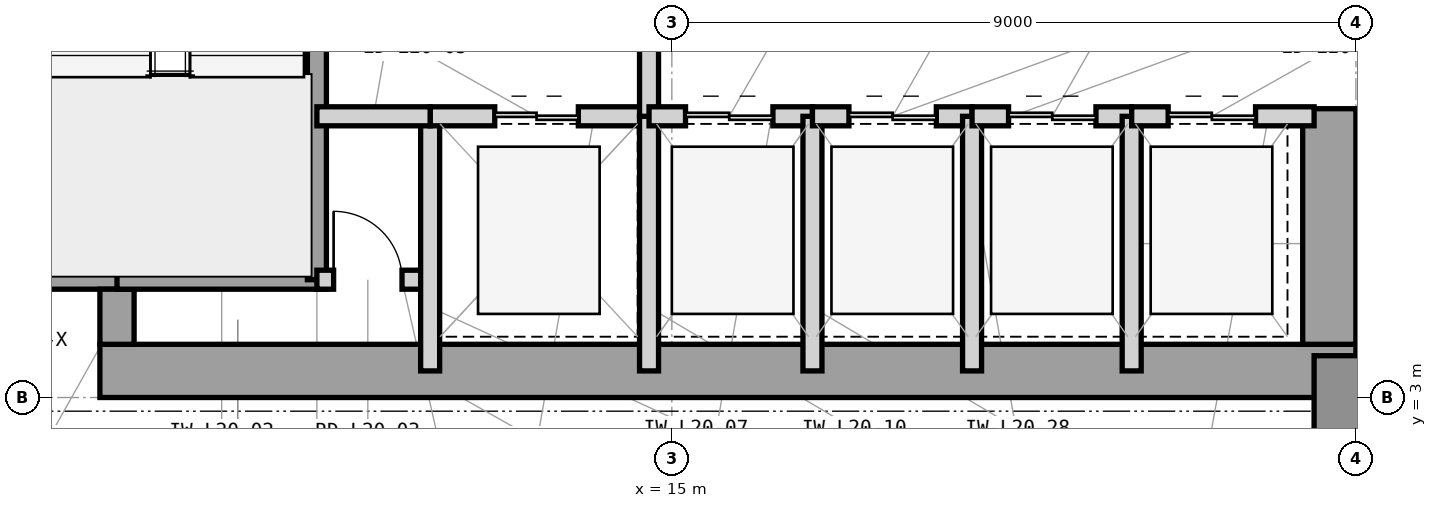
"""IFC4 building model, lengths in metres.
Left out: names, types, materials, properties, quantities, classifications, styles, units other than length and angle.
Written with IfcOpenShell. Run it as: python <this file> out.ifc"""

import sys

from ifc_helpers import new_model, si_unit, direction, frame, frame_2d, origin, origin_2d, place, context, subcontext, project, spatial, rectangle, extrude, element, fill, save


model = new_model("IFC4")
c1 = context("Model", 3, precision=1e-05, world=origin(), true_north=direction((0.0, 1.0)))
c2 = subcontext(c1, "Body", "Model", "MODEL_VIEW")
j1 = project(units=[si_unit("LENGTHUNIT", "METRE"), si_unit("PLANEANGLEUNIT", "RADIAN")], contexts=[c1])
p1 = place(None, origin())
s1 = spatial("IfcSite", under=j1, at=p1, CompositionType="ELEMENT")
p2 = place(p1, origin())
s2 = spatial("IfcBuilding", under=s1, at=p2, CompositionType="ELEMENT")
p3 = place(p2, frame((0.0, 0.0, 89.1)))
s3 = spatial("IfcBuildingStorey", under=s2, at=p3, CompositionType="ELEMENT", Elevation=89.1)
p4 = place(p3, frame((7.475, 3.35, 0.0), z_axis=(0.0, 0.0, 1.0), x_axis=(1.0, 0.0, 0.0)))
e1 = element("IfcWall", 1, at=p4, inside=s3, PredefinedType="SHEAR", context=c2, shape_type="SweptSolid", body=[
    extrude(rectangle(XDim=16.525, YDim=0.7, at=frame_2d((8.262, 0.0))), origin(), (0.0, 0.0, 1.0), 4.2),
])
p5 = place(p3, frame((23.65, 3.7, 0.0), z_axis=(0.0, 0.0, 1.0), x_axis=(0.0, 1.0, 0.0)))
e2 = element("IfcWall", 2, at=p5, inside=s3, PredefinedType="SHEAR", context=c2, shape_type="SweptSolid", body=[
    extrude(rectangle(XDim=3.1, YDim=0.7, at=frame_2d((1.55, 0.0))), origin(), (0.0, 0.0, 1.0), 4.2),
])
p6 = place(p3, frame((6.7, 4.65, 0.0), z_axis=(0.0, 0.0, 1.0), x_axis=(1.0, 0.0, 0.0)))
e3 = element("IfcWall", 3, at=p6, inside=s3, PredefinedType="SHEAR", context=c2, shape_type="SweptSolid", body=[
    extrude(rectangle(XDim=1.225, YDim=0.45, at=frame_2d((0.613, 0.0))), origin(), (0.0, 0.0, 1.0), 4.2),
])
p7 = place(p3, frame((7.7, 3.7, 0.0), z_axis=(0.0, 0.0, 1.0), x_axis=(0.0, 1.0, 0.0)))
e4 = element("IfcWall", 4, at=p7, inside=s3, PredefinedType="SHEAR", context=c2, shape_type="SweptSolid", body=[
    extrude(rectangle(XDim=0.725, YDim=0.45, at=frame_2d((0.363, 0.0))), origin(), (0.0, 0.0, 1.0), 4.2),
])
p8 = place(p3, frame((24.0, 3.0, 0.0), z_axis=(0.0, 0.0, 1.0), x_axis=(1.0, 0.0, 0.0)))
e5 = element("IfcColumn", 5, at=p8, inside=s3, PredefinedType="COLUMN", context=c2, shape_type="SweptSolid", body=[
    extrude(rectangle(XDim=1.1, YDim=1.1, at=origin_2d()), origin(), (0.0, 0.0, 1.0), 4.2),
])
p9 = place(p3, frame((23.9, 3.19, 0.0), z_axis=(0.0, 0.0, 1.0), x_axis=(1.0, 0.0, 0.0)))
e6 = element("IfcWall", 6, at=p9, inside=s3, PredefinedType="STANDARD", context=c2, shape_type="SweptSolid", body=[
    extrude(rectangle(XDim=37.5, YDim=0.38, at=frame_2d((18.75, 0.0))), origin(), (0.0, 0.0, 1.0), 4.0),
])
p10 = place(p9, frame((10.219, 0.0, 0.7)))
e7 = element("IfcOpeningElement", 7, at=p10, cuts=e6, PredefinedType="OPENING", context=c2, shape_type="SweptSolid", body=[
    extrude(rectangle(XDim=3.0, YDim=2.6, at=frame_2d((1.5, 1.3))), frame((0.0, 0.2, 0.0), z_axis=(0.0, -1.0, 0.0), x_axis=(1.0, 0.0, 0.0)), (0.0, 0.0, 1.0), 0.4),
])
p11 = place(p9, frame((19.594, 0.0, 0.7)))
e8 = element("IfcOpeningElement", 8, at=p11, cuts=e6, PredefinedType="OPENING", context=c2, shape_type="SweptSolid", body=[
    extrude(rectangle(XDim=3.0, YDim=2.6, at=frame_2d((1.5, 1.3))), frame((0.0, 0.2, 0.0), z_axis=(0.0, -1.0, 0.0), x_axis=(1.0, 0.0, 0.0)), (0.0, 0.0, 1.0), 0.4),
])
p12 = place(p9, frame((3.514, 0.0, 0.7)))
e9 = element("IfcOpeningElement", 9, at=p12, cuts=e6, PredefinedType="OPENING", context=c2, shape_type="SweptSolid", body=[
    extrude(rectangle(XDim=3.0, YDim=2.6, at=frame_2d((1.5, 1.3))), frame((0.0, 0.2, 0.0), z_axis=(0.0, -1.0, 0.0), x_axis=(1.0, 0.0, 0.0)), (0.0, 0.0, 1.0), 0.4),
])
p13 = place(p9, frame((28.024, 0.0, 0.85)))
e10 = element("IfcOpeningElement", 10, at=p13, cuts=e6, PredefinedType="OPENING", context=c2, shape_type="SweptSolid", body=[
    extrude(rectangle(XDim=1.2, YDim=2.25, at=frame_2d((0.6, 1.125))), frame((0.0, 0.2, 0.0), z_axis=(0.0, -1.0, 0.0), x_axis=(1.0, 0.0, 0.0)), (0.0, 0.0, 1.0), 0.4),
])
p14 = place(p3, frame((7.7, 4.55, 0.0), z_axis=(0.0, 0.0, 1.0), x_axis=(1.0, 0.0, 0.0)))
e11 = element("IfcWall", 11, at=p14, inside=s3, PredefinedType="SHEAR", context=c2, shape_type="SweptSolid", body=[
    extrude(rectangle(XDim=2.755, YDim=0.25, at=frame_2d((1.377, 0.0))), origin(), (0.0, 0.0, 1.0), 4.2),
])
p15 = place(p3, frame((10.33, 4.55, 0.0), z_axis=(0.0, 0.0, 1.0), x_axis=(0.0, 1.0, 0.0)))
e12 = element("IfcWall", 12, at=p15, inside=s3, PredefinedType="SHEAR", context=c2, shape_type="SweptSolid", body=[
    extrude(rectangle(XDim=7.45, YDim=0.25, at=frame_2d((3.725, 0.0))), origin(), (0.0, 0.0, 1.0), 4.2),
])
p16 = place(p15, frame((5.9, 0.0, 0.0)))
e13 = element("IfcOpeningElement", 13, at=p16, cuts=e12, PredefinedType="OPENING", context=c2, shape_type="SweptSolid", body=[
    extrude(rectangle(XDim=1.25, YDim=2.2, at=frame_2d((0.625, 1.1))), frame((0.0, 0.135, 0.0), z_axis=(0.0, -1.0, 0.0), x_axis=(1.0, 0.0, 0.0)), (0.0, 0.0, 1.0), 0.27),
])
p17 = place(p3, frame((10.33, 4.55, 0.0), z_axis=(0.0, 0.0, 1.0), x_axis=(1.0, 0.0, 0.0)))
e14 = element("IfcWall", 14, at=p17, inside=s3, PredefinedType="PARTITIONING", context=c2, shape_type="SweptSolid", body=[
    extrude(rectangle(XDim=1.49, YDim=0.25, at=frame_2d((0.745, 0.0))), origin(), (0.0, 0.0, 1.0), 3.93),
])
p18 = place(p17, frame((0.22, 0.0, 0.0)))
e15 = element("IfcOpeningElement", 15, at=p18, cuts=e14, PredefinedType="OPENING", context=c2, shape_type="SweptSolid", body=[
    extrude(rectangle(XDim=0.9, YDim=2.1, at=frame_2d((0.45, 1.05))), frame((0.0, 0.135, 0.0), z_axis=(0.0, -1.0, 0.0), x_axis=(1.0, 0.0, 0.0)), (0.0, 0.0, 1.0), 0.27),
])
p19 = place(p3, frame((11.82, 3.35, 0.0), z_axis=(0.0, 0.0, 1.0), x_axis=(0.0, 1.0, 0.0)))
e16 = element("IfcWall", 16, at=p19, inside=s3, PredefinedType="PARTITIONING", context=c2, shape_type="SweptSolid", body=[
    extrude(rectangle(XDim=3.35, YDim=0.25, at=frame_2d((1.675, 0.0))), origin(), (0.0, 0.0, 1.0), 3.93),
])
p20 = place(p3, frame((11.82, 6.7, 0.0), z_axis=(0.0, 0.0, 1.0), x_axis=(1.0, 0.0, 0.0)))
e17 = element("IfcWall", 17, at=p20, inside=s3, PredefinedType="PARTITIONING", context=c2, shape_type="SweptSolid", body=[
    extrude(rectangle(XDim=2.88, YDim=0.25, at=frame_2d((1.44, 0.0))), origin(), (0.0, 0.0, 1.0), 3.527),
])
p21 = place(p20, frame((0.85, 0.0, 0.0)))
e18 = element("IfcOpeningElement", 18, at=p21, cuts=e17, PredefinedType="OPENING", context=c2, shape_type="SweptSolid", body=[
    extrude(rectangle(XDim=1.1, YDim=2.25, at=frame_2d((0.55, 1.125))), frame((0.0, 0.135, 0.0), z_axis=(0.0, -1.0, 0.0), x_axis=(1.0, 0.0, 0.0)), (0.0, 0.0, 1.0), 0.27),
])
p22 = place(p3, frame((14.7, 3.35, 0.0), z_axis=(0.0, 0.0, 1.0), x_axis=(0.0, 1.0, 0.0)))
e19 = element("IfcWall", 19, at=p22, inside=s3, PredefinedType="PARTITIONING", context=c2, shape_type="SweptSolid", body=[
    extrude(rectangle(XDim=3.35, YDim=0.25, at=frame_2d((1.675, 0.0))), origin(), (0.0, 0.0, 1.0), 3.93),
])
p23 = place(p3, frame((14.7, 6.7, 0.0), z_axis=(0.0, 0.0, 1.0), x_axis=(0.0, 1.0, 0.0)))
e20 = element("IfcWall", 20, at=p23, inside=s3, PredefinedType="PARTITIONING", context=c2, shape_type="SweptSolid", body=[
    extrude(rectangle(XDim=3.8, YDim=0.25, at=frame_2d((1.9, 0.0))), origin(), (0.0, 0.0, 1.0), 3.93),
])
p24 = place(p23, frame((1.3, 0.0, 0.0)))
e21 = element("IfcOpeningElement", 21, at=p24, cuts=e20, PredefinedType="OPENING", context=c2, shape_type="SweptSolid", body=[
    extrude(rectangle(XDim=1.2, YDim=2.2, at=frame_2d((0.6, 1.1))), frame((0.0, 0.135, 0.0), z_axis=(0.0, -1.0, 0.0), x_axis=(1.0, 0.0, 0.0)), (0.0, 0.0, 1.0), 0.27),
])
p25 = place(p3, frame((10.33, 6.7, 0.0), z_axis=(0.0, 0.0, 1.0), x_axis=(1.0, 0.0, 0.0)))
e22 = element("IfcWall", 22, at=p25, inside=s3, PredefinedType="PARTITIONING", context=c2, shape_type="SweptSolid", body=[
    extrude(rectangle(XDim=1.49, YDim=0.25, at=frame_2d((0.745, 0.0))), origin(), (0.0, 0.0, 1.0), 3.527),
])
p26 = place(p3, frame((14.7, 6.7, 0.0), z_axis=(0.0, 0.0, 1.0), x_axis=(1.0, 0.0, 0.0)))
e23 = element("IfcWall", 23, at=p26, inside=s3, PredefinedType="PARTITIONING", context=c2, shape_type="SweptSolid", body=[
    extrude(rectangle(XDim=2.15, YDim=0.25, at=frame_2d((1.075, 0.0))), origin(), (0.0, 0.0, 1.0), 3.527),
])
p27 = place(p26, frame((0.48, 0.0, 0.0)))
e24 = element("IfcOpeningElement", 24, at=p27, cuts=e23, PredefinedType="OPENING", context=c2, shape_type="SweptSolid", body=[
    extrude(rectangle(XDim=1.15, YDim=2.25, at=frame_2d((0.575, 1.125))), frame((0.0, 0.135, 0.0), z_axis=(0.0, -1.0, 0.0), x_axis=(1.0, 0.0, 0.0)), (0.0, 0.0, 1.0), 0.27),
])
p28 = place(p3, frame((16.85, 3.35, 0.0), z_axis=(0.0, 0.0, 1.0), x_axis=(0.0, 1.0, 0.0)))
e25 = element("IfcWall", 25, at=p28, inside=s3, PredefinedType="PARTITIONING", context=c2, shape_type="SweptSolid", body=[
    extrude(rectangle(XDim=3.35, YDim=0.25, at=frame_2d((1.675, 0.0))), origin(), (0.0, 0.0, 1.0), 3.93),
])
p29 = place(p3, frame((16.85, 6.7, 0.0), z_axis=(0.0, 0.0, 1.0), x_axis=(1.0, 0.0, 0.0)))
e26 = element("IfcWall", 26, at=p29, inside=s3, PredefinedType="PARTITIONING", context=c2, shape_type="SweptSolid", body=[
    extrude(rectangle(XDim=2.1, YDim=0.25, at=frame_2d((1.05, 0.0))), origin(), (0.0, 0.0, 1.0), 3.527),
])
p30 = place(p29, frame((0.48, 0.0, 0.0)))
e27 = element("IfcOpeningElement", 27, at=p30, cuts=e26, PredefinedType="OPENING", context=c2, shape_type="SweptSolid", body=[
    extrude(rectangle(XDim=1.15, YDim=2.25, at=frame_2d((0.575, 1.125))), frame((0.0, 0.135, 0.0), z_axis=(0.0, -1.0, 0.0), x_axis=(1.0, 0.0, 0.0)), (0.0, 0.0, 1.0), 0.27),
])
p31 = place(p3, frame((18.95, 3.35, 0.0), z_axis=(0.0, 0.0, 1.0), x_axis=(0.0, 1.0, 0.0)))
e28 = element("IfcWall", 28, at=p31, inside=s3, PredefinedType="PARTITIONING", context=c2, shape_type="SweptSolid", body=[
    extrude(rectangle(XDim=3.35, YDim=0.25, at=frame_2d((1.675, 0.0))), origin(), (0.0, 0.0, 1.0), 3.93),
])
p32 = place(p3, frame((18.95, 6.7, 0.0), z_axis=(0.0, 0.0, 1.0), x_axis=(1.0, 0.0, 0.0)))
e29 = element("IfcWall", 29, at=p32, inside=s3, PredefinedType="PARTITIONING", context=c2, shape_type="SweptSolid", body=[
    extrude(rectangle(XDim=2.1, YDim=0.25, at=frame_2d((1.05, 0.0))), origin(), (0.0, 0.0, 1.0), 3.527),
])
p33 = place(p32, frame((0.48, 0.0, 0.0)))
e30 = element("IfcOpeningElement", 30, at=p33, cuts=e29, PredefinedType="OPENING", context=c2, shape_type="SweptSolid", body=[
    extrude(rectangle(XDim=1.15, YDim=2.25, at=frame_2d((0.575, 1.125))), frame((0.0, 0.135, 0.0), z_axis=(0.0, -1.0, 0.0), x_axis=(1.0, 0.0, 0.0)), (0.0, 0.0, 1.0), 0.27),
])
p34 = place(p3, frame((21.05, 3.35, 0.0), z_axis=(0.0, 0.0, 1.0), x_axis=(0.0, 1.0, 0.0)))
e31 = element("IfcWall", 31, at=p34, inside=s3, PredefinedType="PARTITIONING", context=c2, shape_type="SweptSolid", body=[
    extrude(rectangle(XDim=3.35, YDim=0.25, at=frame_2d((1.675, 0.0))), origin(), (0.0, 0.0, 1.0), 3.93),
])
p35 = place(p3, frame((21.05, 6.7, 0.0), z_axis=(0.0, 0.0, 1.0), x_axis=(1.0, 0.0, 0.0)))
e32 = element("IfcWall", 32, at=p35, inside=s3, PredefinedType="PARTITIONING", context=c2, shape_type="SweptSolid", body=[
    extrude(rectangle(XDim=2.4, YDim=0.25, at=frame_2d((1.2, 0.0))), origin(), (0.0, 0.0, 1.0), 3.527),
])
p36 = place(p35, frame((0.48, 0.0, 0.0)))
e33 = element("IfcOpeningElement", 33, at=p36, cuts=e32, PredefinedType="OPENING", context=c2, shape_type="SweptSolid", body=[
    extrude(rectangle(XDim=1.15, YDim=2.25, at=frame_2d((0.575, 1.125))), frame((0.0, 0.135, 0.0), z_axis=(0.0, -1.0, 0.0), x_axis=(1.0, 0.0, 0.0)), (0.0, 0.0, 1.0), 0.27),
])
p37 = place(p18, origin())
e34 = element("IfcDoor", 34, at=p37, inside=s3, OperationType="SINGLE_SWING_LEFT", PredefinedType="TRAPDOOR", context=c2, shape_type="SweptSolid", body=[
    extrude(rectangle(XDim=0.9, YDim=2.1, at=frame_2d((0.45, 1.05))), frame((0.0, 0.025, 0.0), z_axis=(0.0, -1.0, 0.0), x_axis=(1.0, 0.0, 0.0)), (0.0, 0.0, 1.0), 0.05),
])
fill(e15, e34)
p38 = place(p21, origin())
e35 = element("IfcDoor", 35, at=p38, inside=s3, OperationType="DOUBLE_DOOR_SLIDING", PredefinedType="DOOR", context=c2, shape_type="SweptSolid", body=[
    extrude(rectangle(XDim=1.1, YDim=2.25, at=frame_2d((0.55, 1.125))), frame((0.0, 0.025, 0.0), z_axis=(0.0, -1.0, 0.0), x_axis=(1.0, 0.0, 0.0)), (0.0, 0.0, 1.0), 0.05),
])
fill(e18, e35)
p39 = place(p27, origin())
e36 = element("IfcDoor", 36, at=p39, inside=s3, OperationType="DOUBLE_DOOR_SLIDING", PredefinedType="DOOR", context=c2, shape_type="SweptSolid", body=[
    extrude(rectangle(XDim=1.15, YDim=2.25, at=frame_2d((0.575, 1.125))), frame((0.0, 0.025, 0.0), z_axis=(0.0, -1.0, 0.0), x_axis=(1.0, 0.0, 0.0)), (0.0, 0.0, 1.0), 0.05),
])
fill(e24, e36)
p40 = place(p30, origin())
e37 = element("IfcDoor", 37, at=p40, inside=s3, OperationType="DOUBLE_DOOR_SLIDING", PredefinedType="DOOR", context=c2, shape_type="SweptSolid", body=[
    extrude(rectangle(XDim=1.15, YDim=2.25, at=frame_2d((0.575, 1.125))), frame((0.0, 0.025, 0.0), z_axis=(0.0, -1.0, 0.0), x_axis=(1.0, 0.0, 0.0)), (0.0, 0.0, 1.0), 0.05),
])
fill(e27, e37)
p41 = place(p33, origin())
e38 = element("IfcDoor", 38, at=p41, inside=s3, OperationType="DOUBLE_DOOR_SLIDING", PredefinedType="DOOR", context=c2, shape_type="SweptSolid", body=[
    extrude(rectangle(XDim=1.15, YDim=2.25, at=frame_2d((0.575, 1.125))), frame((0.0, 0.025, 0.0), z_axis=(0.0, -1.0, 0.0), x_axis=(1.0, 0.0, 0.0)), (0.0, 0.0, 1.0), 0.05),
])
fill(e30, e38)
p42 = place(p36, origin())
e39 = element("IfcDoor", 39, at=p42, inside=s3, OperationType="DOUBLE_DOOR_SLIDING", PredefinedType="DOOR", context=c2, shape_type="SweptSolid", body=[
    extrude(rectangle(XDim=1.15, YDim=2.25, at=frame_2d((0.575, 1.125))), frame((0.0, 0.025, 0.0), z_axis=(0.0, -1.0, 0.0), x_axis=(1.0, 0.0, 0.0)), (0.0, 0.0, 1.0), 0.05),
])
fill(e33, e39)
save(model, sys.argv[1])
